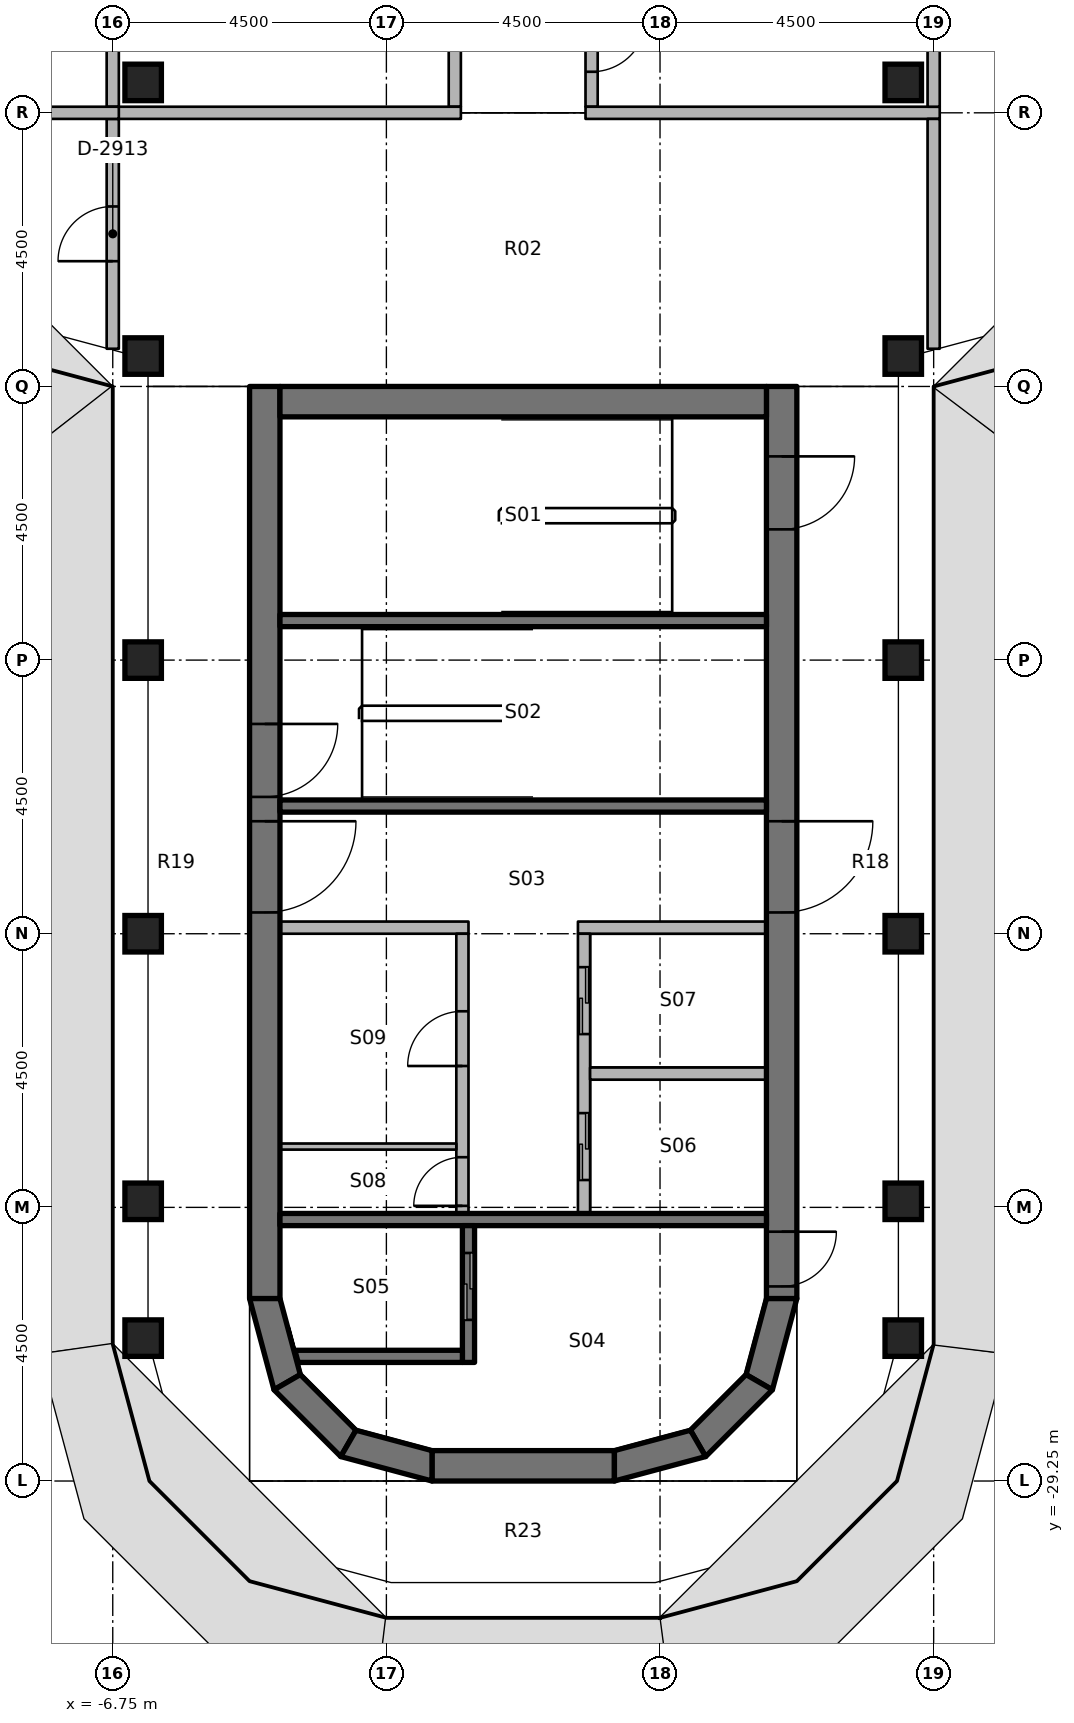
"""IFC4 building model, lengths in metres.
Left out: names, types, materials, properties, quantities, classifications, styles, units other than length and angle.
Written with IfcOpenShell. Run it as: python <this file> out.ifc"""

import sys

from ifc_helpers import new_model, si_unit, direction, frame, frame_2d, origin, origin_2d, place, context, subcontext, project, spatial, polyline, rectangle, outline, extrude, element, fill, save


model = new_model("IFC4")
c1 = context("Model", 3, precision=1e-05, world=origin(), true_north=direction((0.0, 1.0)))
c2 = subcontext(c1, "Body", "Model", "MODEL_VIEW")
j1 = project(units=[si_unit("LENGTHUNIT", "METRE"), si_unit("PLANEANGLEUNIT", "RADIAN")], contexts=[c1])
p1 = place(None, origin())
s1 = spatial("IfcSite", under=j1, at=p1, CompositionType="ELEMENT")
p2 = place(p1, origin())
s2 = spatial("IfcBuilding", under=s1, at=p2, CompositionType="ELEMENT")
p3 = place(p2, frame((0.0, 0.0, 276.4)))
s3 = spatial("IfcBuildingStorey", under=s2, at=p3, CompositionType="ELEMENT", Elevation=276.4)
for number, where, z_axis, x_axis in (
    (1, (-6.25, -26.9, 0.0), (0.0, 0.0, 1.0), (1.0, 0.0, 0.0)),
    (2, (-6.25, -24.65, 0.0), (0.0, 0.0, 1.0), (1.0, 0.0, 0.0)),
    (3, (-6.25, -20.25, 0.0), (0.0, 0.0, 1.0), (1.0, 0.0, 0.0)),
    (4, (-6.25, -15.75, 0.0), (0.0, 0.0, 1.0), (1.0, 0.0, 0.0)),
    (5, (-6.25, -10.75, 0.0), (0.0, 0.0, 1.0), (1.0, 0.0, 0.0)),
    (6, (-6.25, -6.25, 0.0), (0.0, 0.0, 1.0), (1.0, 0.0, 0.0)),
    (7, (6.25, -26.9, 0.0), (0.0, 0.0, 1.0), (1.0, 0.0, 0.0)),
    (8, (6.25, -24.65, 0.0), (0.0, 0.0, 1.0), (1.0, 0.0, 0.0)),
    (9, (6.25, -20.25, 0.0), (0.0, 0.0, 1.0), (1.0, 0.0, 0.0)),
    (10, (6.25, -15.75, 0.0), (0.0, 0.0, 1.0), (1.0, 0.0, 0.0)),
    (11, (6.25, -10.75, 0.0), (0.0, 0.0, 1.0), (1.0, 0.0, 0.0)),
    (12, (6.25, -6.25, 0.0), (0.0, 0.0, 1.0), (1.0, 0.0, 0.0)),
):
    element("IfcColumn", number, at=place(p3, frame(where, z_axis=z_axis, x_axis=x_axis)), inside=s3, PredefinedType="COLUMN", context=c2, shape_type="SweptSolid", body=[
        extrude(rectangle(XDim=0.6, YDim=0.6, at=origin_2d()), origin(), (0.0, 0.0, 1.0), 3.65),
    ])
p4 = place(p3, frame((-4.25, -11.25, 0.0), z_axis=(0.0, 0.0, 1.0), x_axis=(0.0, -1.0, 0.0)))
e13 = element("IfcWall", 13, at=p4, inside=s3, PredefinedType="SHEAR", context=c2, shape_type="SweptSolid", body=[
    extrude(rectangle(XDim=15.0, YDim=0.5, at=frame_2d((7.5, 0.0))), origin(), (0.0, 0.0, 1.0), 3.8),
])
p5 = place(p4, frame((7.15, 0.0, 0.0)))
e14 = element("IfcOpeningElement", 14, at=p5, cuts=e13, PredefinedType="OPENING", context=c2, shape_type="SweptSolid", body=[
    extrude(rectangle(XDim=1.5, YDim=2.3, at=frame_2d((0.75, 1.15))), frame((0.0, 0.26, 0.0), z_axis=(0.0, -1.0, 0.0), x_axis=(1.0, 0.0, 0.0)), (0.0, 0.0, 1.0), 0.52),
])
p6 = place(p4, frame((5.55, 0.0, 0.0)))
e15 = element("IfcOpeningElement", 15, at=p6, cuts=e13, PredefinedType="OPENING", context=c2, shape_type="SweptSolid", body=[
    extrude(rectangle(XDim=1.2, YDim=2.1, at=frame_2d((0.6, 1.05))), frame((0.0, 0.26, 0.0), z_axis=(0.0, -1.0, 0.0), x_axis=(1.0, 0.0, 0.0)), (0.0, 0.0, 1.0), 0.52),
])
p7 = place(p3, frame((4.25, -11.25, 0.0), z_axis=(0.0, 0.0, 1.0), x_axis=(0.0, -1.0, 0.0)))
e16 = element("IfcWall", 16, at=p7, inside=s3, PredefinedType="SHEAR", context=c2, shape_type="SweptSolid", body=[
    extrude(rectangle(XDim=15.0, YDim=0.5, at=frame_2d((7.5, 0.0))), origin(), (0.0, 0.0, 1.0), 3.8),
])
p8 = place(p7, frame((7.15, 0.0, 0.0)))
e17 = element("IfcOpeningElement", 17, at=p8, cuts=e16, PredefinedType="OPENING", context=c2, shape_type="SweptSolid", body=[
    extrude(rectangle(XDim=1.5, YDim=2.3, at=frame_2d((0.75, 1.15))), frame((0.0, 0.26, 0.0), z_axis=(0.0, -1.0, 0.0), x_axis=(1.0, 0.0, 0.0)), (0.0, 0.0, 1.0), 0.52),
])
p9 = place(p7, frame((13.9, 0.0, 0.0)))
e18 = element("IfcOpeningElement", 18, at=p9, cuts=e16, PredefinedType="OPENING", context=c2, shape_type="SweptSolid", body=[
    extrude(rectangle(XDim=0.9, YDim=2.1, at=frame_2d((0.45, 1.05))), frame((0.0, 0.26, 0.0), z_axis=(0.0, -1.0, 0.0), x_axis=(1.0, 0.0, 0.0)), (0.0, 0.0, 1.0), 0.52),
])
p10 = place(p7, frame((1.15, 0.0, 0.0)))
e19 = element("IfcOpeningElement", 19, at=p10, cuts=e16, PredefinedType="OPENING", context=c2, shape_type="SweptSolid", body=[
    extrude(rectangle(XDim=1.2, YDim=2.1, at=frame_2d((0.6, 1.05))), frame((0.0, 0.26, 0.0), z_axis=(0.0, -1.0, 0.0), x_axis=(1.0, 0.0, 0.0)), (0.0, 0.0, 1.0), 0.52),
])
p11 = place(p3, frame((-4.0, -11.5, 0.0), z_axis=(0.0, 0.0, 1.0), x_axis=(1.0, 0.0, 0.0)))
e20 = element("IfcWall", 20, at=p11, inside=s3, PredefinedType="SHEAR", context=c2, shape_type="SweptSolid", body=[
    extrude(rectangle(XDim=8.0, YDim=0.5, at=frame_2d((4.0, 0.0))), origin(), (0.0, 0.0, 1.0), 3.8),
])
p12 = place(p3, frame((-1.5, -29.0, 0.0), z_axis=(0.0, 0.0, 1.0), x_axis=(1.0, 0.0, 0.0)))
e21 = element("IfcWall", 21, at=p12, inside=s3, PredefinedType="SHEAR", context=c2, shape_type="SweptSolid", body=[
    extrude(rectangle(XDim=3.0, YDim=0.5, at=frame_2d((1.5, 0.0))), origin(), (0.0, 0.0, 1.0), 3.8),
])
p13 = place(p3, origin())
e22 = element("IfcWall", 22, at=p13, inside=s3, PredefinedType="SHEAR", context=c2, shape_type="SweptSolid", body=[
    extrude(outline(polyline([(-4.5, -26.25), (-4.098, -27.75), (-3.665, -27.5), (-4.0, -26.25), (-4.5, -26.25)])), origin(), (0.0, 0.0, 1.0), 3.8),
])
p14 = place(p3, origin())
e23 = element("IfcWall", 23, at=p14, inside=s3, PredefinedType="SHEAR", context=c2, shape_type="SweptSolid", body=[
    extrude(outline(polyline([(-4.098, -27.75), (-3.0, -28.848), (-2.75, -28.415), (-3.665, -27.5), (-4.098, -27.75)])), origin(), (0.0, 0.0, 1.0), 3.8),
])
p15 = place(p3, origin())
e24 = element("IfcWall", 24, at=p15, inside=s3, PredefinedType="SHEAR", context=c2, shape_type="SweptSolid", body=[
    extrude(outline(polyline([(-3.0, -28.848), (-1.5, -29.25), (-1.5, -28.75), (-2.75, -28.415), (-3.0, -28.848)])), origin(), (0.0, 0.0, 1.0), 3.8),
])
p16 = place(p3, origin())
e25 = element("IfcWall", 25, at=p16, inside=s3, PredefinedType="SHEAR", context=c2, shape_type="SweptSolid", body=[
    extrude(outline(polyline([(4.5, -26.25), (4.098, -27.75), (3.665, -27.5), (4.0, -26.25), (4.5, -26.25)])), origin(), (0.0, 0.0, 1.0), 3.8),
])
p17 = place(p3, origin())
e26 = element("IfcWall", 26, at=p17, inside=s3, PredefinedType="SHEAR", context=c2, shape_type="SweptSolid", body=[
    extrude(outline(polyline([(4.098, -27.75), (3.0, -28.848), (2.75, -28.415), (3.665, -27.5), (4.098, -27.75)])), origin(), (0.0, 0.0, 1.0), 3.8),
])
p18 = place(p3, origin())
e27 = element("IfcWall", 27, at=p18, inside=s3, PredefinedType="SHEAR", context=c2, shape_type="SweptSolid", body=[
    extrude(outline(polyline([(3.0, -28.848), (1.5, -29.25), (1.5, -28.75), (2.75, -28.415), (3.0, -28.848)])), origin(), (0.0, 0.0, 1.0), 3.8),
])
p19 = place(p3, frame((4.0, -24.95, 0.0), z_axis=(0.0, 0.0, 1.0), x_axis=(-1.0, 0.0, 0.0)))
e28 = element("IfcWall", 28, at=p19, inside=s3, PredefinedType="SHEAR", context=c2, shape_type="SweptSolid", body=[
    extrude(rectangle(XDim=8.0, YDim=0.2, at=frame_2d((4.0, 0.0))), origin(), (0.0, 0.0, 1.0), 3.65),
])
p20 = place(p3, frame((-0.9, -27.3, 0.0), z_axis=(0.0, 0.0, 1.0), x_axis=(0.0, 1.0, 0.0)))
e29 = element("IfcWall", 29, at=p20, inside=s3, PredefinedType="SHEAR", context=c2, shape_type="SweptSolid", body=[
    extrude(rectangle(XDim=2.25, YDim=0.2, at=frame_2d((1.125, 0.0))), origin(), (0.0, 0.0, 1.0), 3.65),
])
p21 = place(p20, frame((0.7, 0.0, 0.0)))
e30 = element("IfcOpeningElement", 30, at=p21, cuts=e29, PredefinedType="OPENING", context=c2, shape_type="SweptSolid", body=[
    extrude(rectangle(XDim=1.1, YDim=2.3, at=frame_2d((0.55, 1.15))), frame((0.0, 0.11, 0.0), z_axis=(0.0, -1.0, 0.0), x_axis=(1.0, 0.0, 0.0)), (0.0, 0.0, 1.0), 0.22),
])
p22 = place(p3, origin())
e31 = element("IfcWall", 31, at=p22, inside=s3, PredefinedType="SHEAR", context=c2, shape_type="SweptSolid", body=[
    extrude(outline(polyline([(-1.0, -27.1), (-3.755, -27.1), (-3.701, -27.3), (-1.0, -27.3), (-1.0, -27.1)])), origin(), (0.0, 0.0, 1.0), 3.65),
])
for number, where, z_axis, x_axis in (
    (32, (4.0, -18.15, 0.0), (0.0, 0.0, 1.0), (-1.0, 0.0, 0.0)),
    (33, (4.0, -15.1, 0.0), (0.0, 0.0, 1.0), (-1.0, 0.0, 0.0)),
):
    element("IfcWall", number, at=place(p3, frame(where, z_axis=z_axis, x_axis=x_axis)), inside=s3, PredefinedType="SHEAR", context=c2, shape_type="SweptSolid", body=[
        extrude(rectangle(XDim=8.0, YDim=0.2, at=frame_2d((4.0, 0.0))), origin(), (0.0, 0.0, 1.0), 3.65),
    ])
p23 = place(p3, frame((4.0, -20.15, 0.0), z_axis=(0.0, 0.0, 1.0), x_axis=(-1.0, 0.0, 0.0)))
e34 = element("IfcWall", 34, at=p23, inside=s3, PredefinedType="PARTITIONING", context=c2, shape_type="SweptSolid", body=[
    extrude(rectangle(XDim=3.1, YDim=0.2, at=frame_2d((1.55, 0.0))), origin(), (0.0, 0.0, 1.0), 3.65),
])
p24 = place(p3, frame((1.0, -24.85, 0.0), z_axis=(0.0, 0.0, 1.0), x_axis=(0.0, 1.0, 0.0)))
e35 = element("IfcWall", 35, at=p24, inside=s3, PredefinedType="PARTITIONING", context=c2, shape_type="SweptSolid", body=[
    extrude(rectangle(XDim=4.6, YDim=0.2, at=frame_2d((2.3, 0.0))), origin(), (0.0, 0.0, 1.0), 3.65),
])
p25 = place(p24, frame((0.55, 0.0, 0.0)))
e36 = element("IfcOpeningElement", 36, at=p25, cuts=e35, PredefinedType="OPENING", context=c2, shape_type="SweptSolid", body=[
    extrude(rectangle(XDim=1.1, YDim=2.3, at=frame_2d((0.55, 1.15))), frame((0.0, 0.11, 0.0), z_axis=(0.0, -1.0, 0.0), x_axis=(1.0, 0.0, 0.0)), (0.0, 0.0, 1.0), 0.22),
])
p26 = place(p24, frame((2.95, 0.0, 0.0)))
e37 = element("IfcOpeningElement", 37, at=p26, cuts=e35, PredefinedType="OPENING", context=c2, shape_type="SweptSolid", body=[
    extrude(rectangle(XDim=1.1, YDim=2.3, at=frame_2d((0.55, 1.15))), frame((0.0, 0.11, 0.0), z_axis=(0.0, -1.0, 0.0), x_axis=(1.0, 0.0, 0.0)), (0.0, 0.0, 1.0), 0.22),
])
p27 = place(p3, frame((-0.9, -20.15, 0.0), z_axis=(0.0, 0.0, 1.0), x_axis=(-1.0, 0.0, 0.0)))
e38 = element("IfcWall", 38, at=p27, inside=s3, PredefinedType="PARTITIONING", context=c2, shape_type="SweptSolid", body=[
    extrude(rectangle(XDim=3.1, YDim=0.2, at=frame_2d((1.55, 0.0))), origin(), (0.0, 0.0, 1.0), 3.65),
])
p28 = place(p3, frame((-1.0, -24.85, 0.0), z_axis=(0.0, 0.0, 1.0), x_axis=(0.0, 1.0, 0.0)))
e39 = element("IfcWall", 39, at=p28, inside=s3, PredefinedType="PARTITIONING", context=c2, shape_type="SweptSolid", body=[
    extrude(rectangle(XDim=4.6, YDim=0.2, at=frame_2d((2.3, 0.0))), origin(), (0.0, 0.0, 1.0), 3.65),
])
p29 = place(p28, frame((0.125, 0.0, 0.0)))
e40 = element("IfcOpeningElement", 40, at=p29, cuts=e39, PredefinedType="OPENING", context=c2, shape_type="SweptSolid", body=[
    extrude(rectangle(XDim=0.8, YDim=2.1, at=frame_2d((0.4, 1.05))), frame((0.0, 0.11, 0.0), z_axis=(0.0, -1.0, 0.0), x_axis=(1.0, 0.0, 0.0)), (0.0, 0.0, 1.0), 0.22),
])
p30 = place(p28, frame((2.425, 0.0, 0.0)))
e41 = element("IfcOpeningElement", 41, at=p30, cuts=e39, PredefinedType="OPENING", context=c2, shape_type="SweptSolid", body=[
    extrude(rectangle(XDim=0.9, YDim=2.1, at=frame_2d((0.45, 1.05))), frame((0.0, 0.11, 0.0), z_axis=(0.0, -1.0, 0.0), x_axis=(1.0, 0.0, 0.0)), (0.0, 0.0, 1.0), 0.22),
])
p31 = place(p3, frame((4.0, -22.55, 0.0), z_axis=(0.0, 0.0, 1.0), x_axis=(-1.0, 0.0, 0.0)))
e42 = element("IfcWall", 42, at=p31, inside=s3, PredefinedType="PARTITIONING", context=c2, shape_type="SweptSolid", body=[
    extrude(rectangle(XDim=2.9, YDim=0.2, at=frame_2d((1.45, 0.0))), origin(), (0.0, 0.0, 1.0), 3.65),
])
p32 = place(p3, frame((-1.1, -23.75, 0.0), z_axis=(0.0, 0.0, 1.0), x_axis=(-1.0, 0.0, 0.0)))
e43 = element("IfcWall", 43, at=p32, inside=s3, PredefinedType="PARTITIONING", context=c2, shape_type="SweptSolid", body=[
    extrude(rectangle(XDim=2.9, YDim=0.1, at=frame_2d((1.45, 0.0))), origin(), (0.0, 0.0, 1.0), 3.65),
])
p33 = place(p3, frame((1.125, -4.6, 0.0), z_axis=(0.0, 0.0, 1.0), x_axis=(0.0, -1.0, 0.0)))
e44 = element("IfcWall", 44, at=p33, inside=s3, PredefinedType="PARTITIONING", context=c2, shape_type="SweptSolid", body=[
    extrude(rectangle(XDim=2.05, YDim=0.2, at=frame_2d((1.025, 0.0))), origin(), (0.0, 0.0, 1.0), 2.75),
])
p34 = place(p33, frame((0.575, 0.0, 0.0)))
e45 = element("IfcOpeningElement", 45, at=p34, cuts=e44, PredefinedType="OPENING", context=c2, shape_type="SweptSolid", body=[
    extrude(rectangle(XDim=0.9, YDim=2.1, at=frame_2d((0.45, 1.05))), frame((0.0, 0.11, 0.0), z_axis=(0.0, -1.0, 0.0), x_axis=(1.0, 0.0, 0.0)), (0.0, 0.0, 1.0), 0.22),
])
p35 = place(p3, frame((-1.125, -6.65, 0.0), z_axis=(0.0, 0.0, 1.0), x_axis=(0.0, 1.0, 0.0)))
e46 = element("IfcWall", 46, at=p35, inside=s3, PredefinedType="PARTITIONING", context=c2, shape_type="SweptSolid", body=[
    extrude(rectangle(XDim=4.3, YDim=0.2, at=frame_2d((2.15, 0.0))), origin(), (0.0, 0.0, 1.0), 2.75),
])
p36 = place(p3, frame((1.025, -6.75, 0.0), z_axis=(0.0, 0.0, 1.0), x_axis=(1.0, 0.0, 0.0)))
e47 = element("IfcWall", 47, at=p36, inside=s3, PredefinedType="PARTITIONING", context=c2, shape_type="SweptSolid", body=[
    extrude(rectangle(XDim=5.825, YDim=0.2, at=frame_2d((2.913, 0.0))), origin(), (0.0, 0.0, 1.0), 2.75),
])
p37 = place(p3, frame((6.75, -10.63, 0.0), z_axis=(0.0, 0.0, 1.0), x_axis=(0.0, 1.0, 0.0)))
e48 = element("IfcWall", 48, at=p37, inside=s3, PredefinedType="PARTITIONING", context=c2, shape_type="SweptSolid", body=[
    extrude(rectangle(XDim=3.78, YDim=0.2, at=frame_2d((1.89, 0.0))), origin(), (0.0, 0.0, 1.0), 2.75),
])
p38 = place(p3, frame((-6.85, -6.75, 0.0), z_axis=(0.0, 0.0, 1.0), x_axis=(1.0, 0.0, 0.0)))
e49 = element("IfcWall", 49, at=p38, inside=s3, PredefinedType="PARTITIONING", context=c2, shape_type="SweptSolid", body=[
    extrude(rectangle(XDim=5.825, YDim=0.2, at=frame_2d((2.913, 0.0))), origin(), (0.0, 0.0, 1.0), 2.75),
])
p39 = place(p3, frame((-6.75, -10.63, 0.0), z_axis=(0.0, 0.0, 1.0), x_axis=(0.0, 1.0, 0.0)))
e50 = element("IfcWall", 50, at=p39, inside=s3, PredefinedType="PARTITIONING", context=c2, shape_type="SweptSolid", body=[
    extrude(rectangle(XDim=3.78, YDim=0.2, at=frame_2d((1.89, 0.0))), origin(), (0.0, 0.0, 1.0), 2.75),
])
p40 = place(p39, frame((1.44, 0.0, 0.0)))
e51 = element("IfcOpeningElement", 51, at=p40, cuts=e50, PredefinedType="OPENING", context=c2, shape_type="SweptSolid", body=[
    extrude(rectangle(XDim=0.9, YDim=2.1, at=frame_2d((0.45, 1.05))), frame((0.0, 0.11, 0.0), z_axis=(0.0, -1.0, 0.0), x_axis=(1.0, 0.0, 0.0)), (0.0, 0.0, 1.0), 0.22),
])
p41 = place(p3, frame((6.75, -6.65, 0.0), z_axis=(0.0, 0.0, 1.0), x_axis=(0.0, 1.0, 0.0)))
e52 = element("IfcWall", 52, at=p41, inside=s3, PredefinedType="PARTITIONING", context=c2, shape_type="SweptSolid", body=[
    extrude(rectangle(XDim=2.05, YDim=0.2, at=frame_2d((1.025, 0.0))), origin(), (0.0, 0.0, 1.0), 2.75),
])
p42 = place(p3, frame((-6.75, -6.65, 0.0), z_axis=(0.0, 0.0, 1.0), x_axis=(0.0, 1.0, 0.0)))
e53 = element("IfcWall", 53, at=p42, inside=s3, PredefinedType="PARTITIONING", context=c2, shape_type="SweptSolid", body=[
    extrude(rectangle(XDim=4.3, YDim=0.2, at=frame_2d((2.15, 0.0))), origin(), (0.0, 0.0, 1.0), 2.75),
])
p43 = place(p3, frame((-11.35, -6.75, 0.0), z_axis=(0.0, 0.0, 1.0), x_axis=(1.0, 0.0, 0.0)))
e54 = element("IfcWall", 54, at=p43, inside=s3, PredefinedType="PARTITIONING", context=c2, shape_type="SweptSolid", body=[
    extrude(rectangle(XDim=4.7, YDim=0.2, at=frame_2d((2.35, 0.0))), origin(), (0.0, 0.0, 1.0), 2.75),
])
p44 = place(p8, origin())
e55 = element("IfcDoor", 55, at=p44, inside=s3, OperationType="DOUBLE_DOOR_SINGLE_SWING", PredefinedType="DOOR", context=c2, shape_type="SweptSolid", body=[
    extrude(rectangle(XDim=1.5, YDim=2.3, at=frame_2d((0.75, 1.15))), frame((0.0, 0.025, 0.0), z_axis=(0.0, -1.0, 0.0), x_axis=(1.0, 0.0, 0.0)), (0.0, 0.0, 1.0), 0.05),
])
fill(e17, e55)
p45 = place(p5, origin())
e56 = element("IfcDoor", 56, at=p45, inside=s3, OperationType="DOUBLE_DOOR_SINGLE_SWING", PredefinedType="DOOR", context=c2, shape_type="SweptSolid", body=[
    extrude(rectangle(XDim=1.5, YDim=2.3, at=frame_2d((0.75, 1.15))), frame((0.0, 0.025, 0.0), z_axis=(0.0, -1.0, 0.0), x_axis=(1.0, 0.0, 0.0)), (0.0, 0.0, 1.0), 0.05),
])
fill(e14, e56)
p46 = place(p9, origin())
e57 = element("IfcDoor", 57, at=p46, inside=s3, OperationType="SINGLE_SWING_LEFT", PredefinedType="DOOR", context=c2, shape_type="SweptSolid", body=[
    extrude(rectangle(XDim=0.9, YDim=2.1, at=frame_2d((0.45, 1.05))), frame((0.0, 0.025, 0.0), z_axis=(0.0, -1.0, 0.0), x_axis=(1.0, 0.0, 0.0)), (0.0, 0.0, 1.0), 0.05),
])
fill(e18, e57)
p47 = place(p6, origin())
e58 = element("IfcDoor", 58, at=p47, inside=s3, OperationType="SINGLE_SWING_RIGHT", PredefinedType="DOOR", context=c2, shape_type="SweptSolid", body=[
    extrude(rectangle(XDim=1.2, YDim=2.1, at=frame_2d((0.6, 1.05))), frame((0.0, 0.025, 0.0), z_axis=(0.0, -1.0, 0.0), x_axis=(1.0, 0.0, 0.0)), (0.0, 0.0, 1.0), 0.05),
])
fill(e15, e58)
p48 = place(p10, origin())
e59 = element("IfcDoor", 59, at=p48, inside=s3, OperationType="SINGLE_SWING_LEFT", PredefinedType="DOOR", context=c2, shape_type="SweptSolid", body=[
    extrude(rectangle(XDim=1.2, YDim=2.1, at=frame_2d((0.6, 1.05))), frame((0.0, 0.025, 0.0), z_axis=(0.0, -1.0, 0.0), x_axis=(1.0, 0.0, 0.0)), (0.0, 0.0, 1.0), 0.05),
])
fill(e19, e59)
p49 = place(p21, origin())
e60 = element("IfcDoor", 60, at=p49, inside=s3, OperationType="DOUBLE_DOOR_SLIDING", PredefinedType="DOOR", context=c2, shape_type="SweptSolid", body=[
    extrude(rectangle(XDim=1.1, YDim=2.3, at=frame_2d((0.55, 1.15))), frame((0.0, 0.025, 0.0), z_axis=(0.0, -1.0, 0.0), x_axis=(1.0, 0.0, 0.0)), (0.0, 0.0, 1.0), 0.05),
])
fill(e30, e60)
p50 = place(p25, origin())
e61 = element("IfcDoor", 61, at=p50, inside=s3, OperationType="DOUBLE_DOOR_SLIDING", PredefinedType="DOOR", context=c2, shape_type="SweptSolid", body=[
    extrude(rectangle(XDim=1.1, YDim=2.3, at=frame_2d((0.55, 1.15))), frame((0.0, 0.025, 0.0), z_axis=(0.0, -1.0, 0.0), x_axis=(1.0, 0.0, 0.0)), (0.0, 0.0, 1.0), 0.05),
])
fill(e36, e61)
p51 = place(p26, origin())
e62 = element("IfcDoor", 62, at=p51, inside=s3, OperationType="DOUBLE_DOOR_SLIDING", PredefinedType="DOOR", context=c2, shape_type="SweptSolid", body=[
    extrude(rectangle(XDim=1.1, YDim=2.3, at=frame_2d((0.55, 1.15))), frame((0.0, 0.025, 0.0), z_axis=(0.0, -1.0, 0.0), x_axis=(1.0, 0.0, 0.0)), (0.0, 0.0, 1.0), 0.05),
])
fill(e37, e62)
p52 = place(p29, origin())
e63 = element("IfcDoor", 63, at=p52, inside=s3, OperationType="SINGLE_SWING_LEFT", PredefinedType="DOOR", context=c2, shape_type="SweptSolid", body=[
    extrude(rectangle(XDim=0.8, YDim=2.1, at=frame_2d((0.4, 1.05))), frame((0.0, 0.025, 0.0), z_axis=(0.0, -1.0, 0.0), x_axis=(1.0, 0.0, 0.0)), (0.0, 0.0, 1.0), 0.05),
])
fill(e40, e63)
p53 = place(p30, origin())
e64 = element("IfcDoor", 64, at=p53, inside=s3, OperationType="SINGLE_SWING_LEFT", PredefinedType="DOOR", context=c2, shape_type="SweptSolid", body=[
    extrude(rectangle(XDim=0.9, YDim=2.1, at=frame_2d((0.45, 1.05))), frame((0.0, 0.025, 0.0), z_axis=(0.0, -1.0, 0.0), x_axis=(1.0, 0.0, 0.0)), (0.0, 0.0, 1.0), 0.05),
])
fill(e41, e64)
p54 = place(p34, origin())
e65 = element("IfcDoor", 65, at=p54, inside=s3, OperationType="SINGLE_SWING_RIGHT", PredefinedType="DOOR", context=c2, shape_type="SweptSolid", body=[
    extrude(rectangle(XDim=0.9, YDim=2.1, at=frame_2d((0.45, 1.05))), frame((0.0, 0.025, 0.0), z_axis=(0.0, -1.0, 0.0), x_axis=(1.0, 0.0, 0.0)), (0.0, 0.0, 1.0), 0.05),
])
fill(e45, e65)
p55 = place(p40, origin())
e66 = element("IfcDoor", 66, at=p55, inside=s3, OperationType="SINGLE_SWING_RIGHT", PredefinedType="DOOR", context=c2, shape_type="SweptSolid", body=[
    extrude(rectangle(XDim=0.9, YDim=2.1, at=frame_2d((0.45, 1.05))), frame((0.0, 0.025, 0.0), z_axis=(0.0, -1.0, 0.0), x_axis=(1.0, 0.0, 0.0)), (0.0, 0.0, 1.0), 0.05),
])
fill(e51, e66)
save(model, sys.argv[1])
